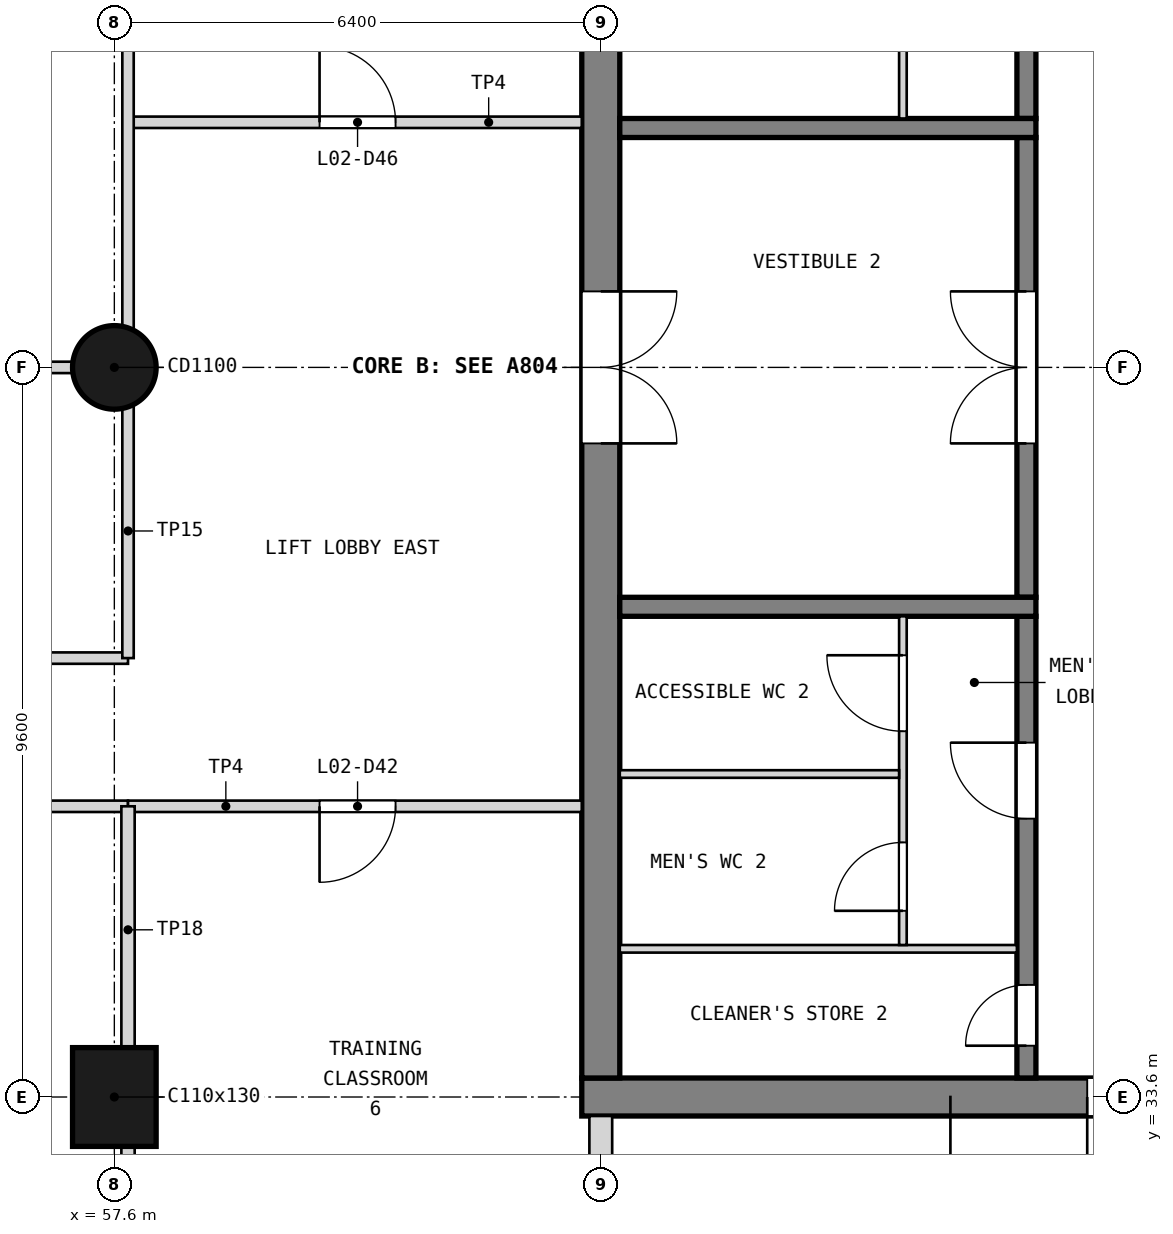
"""IFC4 building model, lengths in metres.
Left out: names, types, materials, properties, quantities, classifications, styles, units other than length and angle.
Written with IfcOpenShell. Run it as: python <this file> out.ifc"""

import sys

from ifc_helpers import new_model, si_unit, direction, frame, frame_2d, origin, origin_2d, place, context, subcontext, project, spatial, rectangle, circle, extrude, element, fill, save


model = new_model("IFC4")
c1 = context("Model", 3, precision=1e-05, world=origin(), true_north=direction((0.0, 1.0)))
c2 = subcontext(c1, "Body", "Model", "MODEL_VIEW")
j1 = project(units=[si_unit("LENGTHUNIT", "METRE"), si_unit("PLANEANGLEUNIT", "RADIAN")], contexts=[c1])
p1 = place(None, origin())
s1 = spatial("IfcSite", under=j1, at=p1, CompositionType="ELEMENT")
p2 = place(p1, origin())
s2 = spatial("IfcBuilding", under=s1, at=p2, CompositionType="ELEMENT")
p3 = place(p2, frame((0.0, 0.0, 8.4)))
s3 = spatial("IfcBuildingStorey", under=s2, at=p3, CompositionType="ELEMENT", Elevation=8.4)
p4 = place(p3, frame((63.75, 33.6, 0.0), z_axis=(0.0, 0.0, 1.0), x_axis=(1.0, 0.0, 0.0)))
e1 = element("IfcWall", 1, at=p4, inside=s3, PredefinedType="SHEAR", context=c2, shape_type="SweptSolid", body=[
    extrude(rectangle(XDim=13.3, YDim=0.5, at=frame_2d((6.65, 0.0))), origin(), (0.0, 0.0, 1.0), 4.5),
])
p5 = place(p4, frame((11.05, 0.0, 1.0)))
e2 = element("IfcOpeningElement", 2, at=p5, cuts=e1, PredefinedType="OPENING", context=c2, shape_type="SweptSolid", body=[
    extrude(rectangle(XDim=0.4, YDim=2.0, at=frame_2d((0.2, 1.0))), frame((0.0, 0.26, 0.0), z_axis=(0.0, -1.0, 0.0), x_axis=(1.0, 0.0, 0.0)), (0.0, 0.0, 1.0), 0.52),
])
p6 = place(p4, frame((6.65, 0.0, 0.0)))
e3 = element("IfcOpeningElement", 3, at=p6, cuts=e1, PredefinedType="OPENING", context=c2, shape_type="SweptSolid", body=[
    extrude(rectangle(XDim=2.0, YDim=2.1, at=frame_2d((1.0, 1.05))), frame((0.0, 0.26, 0.0), z_axis=(0.0, -1.0, 0.0), x_axis=(1.0, 0.0, 0.0)), (0.0, 0.0, 1.0), 0.52),
])
p7 = place(p3, frame((64.0, 33.85, 0.0), z_axis=(0.0, 0.0, 1.0), x_axis=(0.0, 1.0, 0.0)))
e4 = element("IfcWall", 4, at=p7, inside=s3, PredefinedType="SHEAR", context=c2, shape_type="SweptSolid", body=[
    extrude(rectangle(XDim=18.7, YDim=0.5, at=frame_2d((9.35, 0.0))), origin(), (0.0, 0.0, 1.0), 4.5),
])
p8 = place(p7, frame((8.35, 0.0, 0.0)))
e5 = element("IfcOpeningElement", 5, at=p8, cuts=e4, PredefinedType="OPENING", context=c2, shape_type="SweptSolid", body=[
    extrude(rectangle(XDim=2.0, YDim=2.1, at=frame_2d((1.0, 1.05))), frame((0.0, 0.26, 0.0), z_axis=(0.0, -1.0, 0.0), x_axis=(1.0, 0.0, 0.0)), (0.0, 0.0, 1.0), 0.52),
])
p9 = place(p3, frame((57.6, 33.6, 0.0), z_axis=(0.0, 0.0, 1.0), x_axis=(1.0, 0.0, 0.0)))
e6 = element("IfcColumn", 6, at=p9, inside=s3, PredefinedType="COLUMN", context=c2, shape_type="SweptSolid", body=[
    extrude(rectangle(XDim=1.1, YDim=1.3, at=origin_2d()), origin(), (0.0, 0.0, 1.0), 4.5),
])
p10 = place(p3, frame((57.6, 43.2, 0.0), z_axis=(0.0, 0.0, 1.0), x_axis=(1.0, 0.0, 0.0)))
e7 = element("IfcColumn", 7, at=p10, inside=s3, PredefinedType="COLUMN", context=c2, shape_type="SweptSolid", body=[
    extrude(circle(Radius=0.55, at=origin_2d()), origin(), (0.0, 0.0, 1.0), 4.5),
])
p11 = place(p3, frame((64.0, 31.0, 0.0), z_axis=(0.0, 0.0, 1.0), x_axis=(0.0, 1.0, 0.0)))
e8 = element("IfcWall", 8, at=p11, inside=s3, PredefinedType="SOLIDWALL", context=c2, shape_type="SweptSolid", body=[
    extrude(rectangle(XDim=2.35, YDim=0.3, at=frame_2d((1.175, 0.0))), origin(), (0.0, 0.0, 1.0), 3.48),
])
p12 = place(p3, frame((69.6, 33.85, 0.0), z_axis=(0.0, 0.0, 1.0), x_axis=(0.0, 1.0, 0.0)))
e9 = element("IfcWall", 9, at=p12, inside=s3, PredefinedType="SOLIDWALL", context=c2, shape_type="SweptSolid", body=[
    extrude(rectangle(XDim=6.075, YDim=0.25, at=frame_2d((3.038, 0.0))), origin(), (0.0, 0.0, 1.0), 4.2),
])
p13 = place(p12, frame((0.425, 0.0, 0.0)))
e10 = element("IfcOpeningElement", 10, at=p13, cuts=e9, PredefinedType="OPENING", context=c2, shape_type="SweptSolid", body=[
    extrude(rectangle(XDim=0.8, YDim=2.1, at=frame_2d((0.4, 1.05))), frame((0.0, 0.135, 0.0), z_axis=(0.0, -1.0, 0.0), x_axis=(1.0, 0.0, 0.0)), (0.0, 0.0, 1.0), 0.27),
])
p14 = place(p12, frame((3.413, 0.0, 0.0)))
e11 = element("IfcOpeningElement", 11, at=p14, cuts=e9, PredefinedType="OPENING", context=c2, shape_type="SweptSolid", body=[
    extrude(rectangle(XDim=1.0, YDim=2.1, at=frame_2d((0.5, 1.05))), frame((0.0, 0.135, 0.0), z_axis=(0.0, -1.0, 0.0), x_axis=(1.0, 0.0, 0.0)), (0.0, 0.0, 1.0), 0.27),
])
p15 = place(p3, frame((69.6, 40.175, 0.0), z_axis=(0.0, 0.0, 1.0), x_axis=(0.0, 1.0, 0.0)))
e12 = element("IfcWall", 12, at=p15, inside=s3, PredefinedType="SOLIDWALL", context=c2, shape_type="SweptSolid", body=[
    extrude(rectangle(XDim=6.05, YDim=0.25, at=frame_2d((3.025, 0.0))), origin(), (0.0, 0.0, 1.0), 4.2),
])
p16 = place(p15, frame((2.025, 0.0, 0.0)))
e13 = element("IfcOpeningElement", 13, at=p16, cuts=e12, PredefinedType="OPENING", context=c2, shape_type="SweptSolid", body=[
    extrude(rectangle(XDim=2.0, YDim=2.1, at=frame_2d((1.0, 1.05))), frame((0.0, 0.135, 0.0), z_axis=(0.0, -1.0, 0.0), x_axis=(1.0, 0.0, 0.0)), (0.0, 0.0, 1.0), 0.27),
])
p17 = place(p3, frame((69.6, 46.475, 0.0), z_axis=(0.0, 0.0, 1.0), x_axis=(0.0, 1.0, 0.0)))
e14 = element("IfcWall", 14, at=p17, inside=s3, PredefinedType="SOLIDWALL", context=c2, shape_type="SweptSolid", body=[
    extrude(rectangle(XDim=6.075, YDim=0.25, at=frame_2d((3.038, 0.0))), origin(), (0.0, 0.0, 1.0), 4.2),
])
p18 = place(p17, frame((1.312, 0.0, 0.0)))
e15 = element("IfcOpeningElement", 15, at=p18, cuts=e14, PredefinedType="OPENING", context=c2, shape_type="SweptSolid", body=[
    extrude(rectangle(XDim=1.0, YDim=2.1, at=frame_2d((0.5, 1.05))), frame((0.0, 0.135, 0.0), z_axis=(0.0, -1.0, 0.0), x_axis=(1.0, 0.0, 0.0)), (0.0, 0.0, 1.0), 0.27),
])
p19 = place(p17, frame((4.45, 0.0, 0.0)))
e16 = element("IfcOpeningElement", 16, at=p19, cuts=e14, PredefinedType="OPENING", context=c2, shape_type="SweptSolid", body=[
    extrude(rectangle(XDim=0.9, YDim=2.1, at=frame_2d((0.45, 1.05))), frame((0.0, 0.135, 0.0), z_axis=(0.0, -1.0, 0.0), x_axis=(1.0, 0.0, 0.0)), (0.0, 0.0, 1.0), 0.27),
])
for number, where, z_axis, x_axis in (
    (17, (69.725, 40.05, 0.0), (0.0, 0.0, 1.0), (-1.0, 0.0, 0.0)),
    (18, (69.725, 46.35, 0.0), (0.0, 0.0, 1.0), (-1.0, 0.0, 0.0)),
):
    element("IfcWall", number, at=place(p3, frame(where, z_axis=z_axis, x_axis=x_axis)), inside=s3, PredefinedType="SOLIDWALL", context=c2, shape_type="SweptSolid", body=[
        extrude(rectangle(XDim=5.475, YDim=0.25, at=frame_2d((2.738, 0.0))), origin(), (0.0, 0.0, 1.0), 4.2),
    ])
p20 = place(p3, frame((69.475, 35.55, 0.0), z_axis=(0.0, 0.0, 1.0), x_axis=(-1.0, 0.0, 0.0)))
e19 = element("IfcWall", 19, at=p20, inside=s3, PredefinedType="PARTITIONING", context=c2, shape_type="SweptSolid", body=[
    extrude(rectangle(XDim=5.225, YDim=0.1, at=frame_2d((2.613, 0.0))), origin(), (0.0, 0.0, 1.0), 4.2),
])
p21 = place(p3, frame((67.975, 35.6, 0.0), z_axis=(0.0, 0.0, 1.0), x_axis=(0.0, 1.0, 0.0)))
e20 = element("IfcWall", 20, at=p21, inside=s3, PredefinedType="PARTITIONING", context=c2, shape_type="SweptSolid", body=[
    extrude(rectangle(XDim=4.325, YDim=0.1, at=frame_2d((2.163, 0.0))), origin(), (0.0, 0.0, 1.0), 4.2),
])
p22 = place(p21, frame((0.45, 0.0, 0.0)))
e21 = element("IfcOpeningElement", 21, at=p22, cuts=e20, PredefinedType="OPENING", context=c2, shape_type="SweptSolid", body=[
    extrude(rectangle(XDim=0.9, YDim=2.1, at=frame_2d((0.45, 1.05))), frame((0.0, 0.06, 0.0), z_axis=(0.0, -1.0, 0.0), x_axis=(1.0, 0.0, 0.0)), (0.0, 0.0, 1.0), 0.12),
])
p23 = place(p21, frame((2.812, 0.0, 0.0)))
e22 = element("IfcOpeningElement", 22, at=p23, cuts=e20, PredefinedType="OPENING", context=c2, shape_type="SweptSolid", body=[
    extrude(rectangle(XDim=1.0, YDim=2.1, at=frame_2d((0.5, 1.05))), frame((0.0, 0.06, 0.0), z_axis=(0.0, -1.0, 0.0), x_axis=(1.0, 0.0, 0.0)), (0.0, 0.0, 1.0), 0.12),
])
p24 = place(p3, frame((67.925, 37.85, 0.0), z_axis=(0.0, 0.0, 1.0), x_axis=(-1.0, 0.0, 0.0)))
e23 = element("IfcWall", 23, at=p24, inside=s3, PredefinedType="PARTITIONING", context=c2, shape_type="SweptSolid", body=[
    extrude(rectangle(XDim=3.675, YDim=0.1, at=frame_2d((1.837, 0.0))), origin(), (0.0, 0.0, 1.0), 4.2),
])
p25 = place(p3, frame((67.975, 46.475, 0.0), z_axis=(0.0, 0.0, 1.0), x_axis=(0.0, 1.0, 0.0)))
e24 = element("IfcWall", 24, at=p25, inside=s3, PredefinedType="PARTITIONING", context=c2, shape_type="SweptSolid", body=[
    extrude(rectangle(XDim=3.625, YDim=0.1, at=frame_2d((1.812, 0.0))), origin(), (0.0, 0.0, 1.0), 4.2),
])
p26 = place(p25, frame((1.363, 0.0, 0.0)))
e25 = element("IfcOpeningElement", 25, at=p26, cuts=e24, PredefinedType="OPENING", context=c2, shape_type="SweptSolid", body=[
    extrude(rectangle(XDim=0.9, YDim=2.1, at=frame_2d((0.45, 1.05))), frame((0.0, 0.06, 0.0), z_axis=(0.0, -1.0, 0.0), x_axis=(1.0, 0.0, 0.0)), (0.0, 0.0, 1.0), 0.12),
])
p27 = place(p3, frame((51.38, 37.425, 0.0), z_axis=(0.0, 0.0, 1.0), x_axis=(1.0, 0.0, 0.0)))
e26 = element("IfcWall", 26, at=p27, inside=s3, PredefinedType="PARTITIONING", context=c2, shape_type="SweptSolid", body=[
    extrude(rectangle(XDim=6.4, YDim=0.15, at=frame_2d((3.2, 0.0))), origin(), (0.0, 0.0, 1.0), 4.28),
])
p28 = place(p27, frame((2.72, 0.0, 0.0)))
e27 = element("IfcOpeningElement", 27, at=p28, cuts=e26, PredefinedType="OPENING", context=c2, shape_type="SweptSolid", body=[
    extrude(rectangle(XDim=1.0, YDim=2.1, at=frame_2d((0.5, 1.05))), frame((0.0, 0.085, 0.0), z_axis=(0.0, -1.0, 0.0), x_axis=(1.0, 0.0, 0.0)), (0.0, 0.0, 1.0), 0.17),
])
p29 = place(p3, frame((57.78, 37.425, 0.0), z_axis=(0.0, 0.0, 1.0), x_axis=(1.0, 0.0, 0.0)))
e28 = element("IfcWall", 28, at=p29, inside=s3, PredefinedType="PARTITIONING", context=c2, shape_type="SweptSolid", body=[
    extrude(rectangle(XDim=5.97, YDim=0.15, at=frame_2d((2.985, 0.0))), origin(), (0.0, 0.0, 1.0), 4.28),
])
p30 = place(p29, frame((2.52, 0.0, 0.0)))
e29 = element("IfcOpeningElement", 29, at=p30, cuts=e28, PredefinedType="OPENING", context=c2, shape_type="SweptSolid", body=[
    extrude(rectangle(XDim=1.0, YDim=2.1, at=frame_2d((0.5, 1.05))), frame((0.0, 0.085, 0.0), z_axis=(0.0, -1.0, 0.0), x_axis=(1.0, 0.0, 0.0)), (0.0, 0.0, 1.0), 0.17),
])
p31 = place(p3, frame((57.78, 31.3, 0.0), z_axis=(0.0, 0.0, 1.0), x_axis=(0.0, 1.0, 0.0)))
e30 = element("IfcWall", 30, at=p31, inside=s3, PredefinedType="PARTITIONING", context=c2, shape_type="SweptSolid", body=[
    extrude(rectangle(XDim=1.67, YDim=0.175, at=frame_2d((0.835, 0.0))), origin(), (0.0, 0.0, 1.0), 3.38),
])
p32 = place(p3, frame((57.78, 34.23, 0.0), z_axis=(0.0, 0.0, 1.0), x_axis=(0.0, 1.0, 0.0)))
e31 = element("IfcWall", 31, at=p32, inside=s3, PredefinedType="PARTITIONING", context=c2, shape_type="SweptSolid", body=[
    extrude(rectangle(XDim=3.195, YDim=0.175, at=frame_2d((1.598, 0.0))), origin(), (0.0, 0.0, 1.0), 3.38),
])
p33 = place(p3, frame((31.82, 39.375, 0.0), z_axis=(0.0, 0.0, 1.0), x_axis=(1.0, 0.0, 0.0)))
e32 = element("IfcWall", 32, at=p33, inside=s3, PredefinedType="PARTITIONING", context=c2, shape_type="SweptSolid", body=[
    extrude(rectangle(XDim=25.96, YDim=0.15, at=frame_2d((12.98, 0.0))), origin(), (0.0, 0.0, 1.0), 4.28),
])
p34 = place(p33, frame((5.63, 0.0, 0.0)))
e33 = element("IfcOpeningElement", 33, at=p34, cuts=e32, PredefinedType="OPENING", context=c2, shape_type="SweptSolid", body=[
    extrude(rectangle(XDim=1.8, YDim=2.1, at=frame_2d((0.9, 1.05))), frame((0.0, 0.085, 0.0), z_axis=(0.0, -1.0, 0.0), x_axis=(1.0, 0.0, 0.0)), (0.0, 0.0, 1.0), 0.17),
])
p35 = place(p33, frame((18.53, 0.0, 0.0)))
e34 = element("IfcOpeningElement", 34, at=p35, cuts=e32, PredefinedType="OPENING", context=c2, shape_type="SweptSolid", body=[
    extrude(rectangle(XDim=1.8, YDim=2.1, at=frame_2d((0.9, 1.05))), frame((0.0, 0.085, 0.0), z_axis=(0.0, -1.0, 0.0), x_axis=(1.0, 0.0, 0.0)), (0.0, 0.0, 1.0), 0.17),
])
p36 = place(p3, frame((31.82, 43.2, 0.0), z_axis=(0.0, 0.0, 1.0), x_axis=(1.0, 0.0, 0.0)))
e35 = element("IfcWall", 35, at=p36, inside=s3, PredefinedType="PARTITIONING", context=c2, shape_type="SweptSolid", body=[
    extrude(rectangle(XDim=25.96, YDim=0.15, at=frame_2d((12.98, 0.0))), origin(), (0.0, 0.0, 1.0), 3.48),
])
p37 = place(p36, frame((3.175, 0.0, 0.0)))
e36 = element("IfcOpeningElement", 36, at=p37, cuts=e35, PredefinedType="OPENING", context=c2, shape_type="SweptSolid", body=[
    extrude(rectangle(XDim=1.8, YDim=2.1, at=frame_2d((0.9, 1.05))), frame((0.0, 0.085, 0.0), z_axis=(0.0, -1.0, 0.0), x_axis=(1.0, 0.0, 0.0)), (0.0, 0.0, 1.0), 0.17),
])
p38 = place(p36, frame((10.325, 0.0, 0.0)))
e37 = element("IfcOpeningElement", 37, at=p38, cuts=e35, PredefinedType="OPENING", context=c2, shape_type="SweptSolid", body=[
    extrude(rectangle(XDim=1.8, YDim=2.1, at=frame_2d((0.9, 1.05))), frame((0.0, 0.085, 0.0), z_axis=(0.0, -1.0, 0.0), x_axis=(1.0, 0.0, 0.0)), (0.0, 0.0, 1.0), 0.17),
])
p39 = place(p36, frame((17.518, 0.0, 0.0)))
e38 = element("IfcOpeningElement", 38, at=p39, cuts=e35, PredefinedType="OPENING", context=c2, shape_type="SweptSolid", body=[
    extrude(rectangle(XDim=1.0, YDim=2.1, at=frame_2d((0.5, 1.05))), frame((0.0, 0.085, 0.0), z_axis=(0.0, -1.0, 0.0), x_axis=(1.0, 0.0, 0.0)), (0.0, 0.0, 1.0), 0.17),
])
p40 = place(p36, frame((22.607, 0.0, 0.0)))
e39 = element("IfcOpeningElement", 39, at=p40, cuts=e35, PredefinedType="OPENING", context=c2, shape_type="SweptSolid", body=[
    extrude(rectangle(XDim=1.8, YDim=2.1, at=frame_2d((0.9, 1.05))), frame((0.0, 0.085, 0.0), z_axis=(0.0, -1.0, 0.0), x_axis=(1.0, 0.0, 0.0)), (0.0, 0.0, 1.0), 0.17),
])
p41 = place(p3, frame((57.78, 46.425, 0.0), z_axis=(0.0, 0.0, 1.0), x_axis=(1.0, 0.0, 0.0)))
e40 = element("IfcWall", 40, at=p41, inside=s3, PredefinedType="PARTITIONING", context=c2, shape_type="SweptSolid", body=[
    extrude(rectangle(XDim=5.97, YDim=0.15, at=frame_2d((2.985, 0.0))), origin(), (0.0, 0.0, 1.0), 4.28),
])
p42 = place(p41, frame((2.52, 0.0, 0.0)))
e41 = element("IfcOpeningElement", 41, at=p42, cuts=e40, PredefinedType="OPENING", context=c2, shape_type="SweptSolid", body=[
    extrude(rectangle(XDim=1.0, YDim=2.1, at=frame_2d((0.5, 1.05))), frame((0.0, 0.085, 0.0), z_axis=(0.0, -1.0, 0.0), x_axis=(1.0, 0.0, 0.0)), (0.0, 0.0, 1.0), 0.17),
])
p43 = place(p3, frame((57.78, 39.375, 0.0), z_axis=(0.0, 0.0, 1.0), x_axis=(0.0, 1.0, 0.0)))
e42 = element("IfcWall", 42, at=p43, inside=s3, PredefinedType="PARTITIONING", context=c2, shape_type="SweptSolid", body=[
    extrude(rectangle(XDim=3.325, YDim=0.15, at=frame_2d((1.663, 0.0))), origin(), (0.0, 0.0, 1.0), 3.38),
])
p44 = place(p3, frame((57.78, 43.7, 0.0), z_axis=(0.0, 0.0, 1.0), x_axis=(0.0, 1.0, 0.0)))
e43 = element("IfcWall", 43, at=p44, inside=s3, PredefinedType="PARTITIONING", context=c2, shape_type="SweptSolid", body=[
    extrude(rectangle(XDim=8.47, YDim=0.15, at=frame_2d((4.235, 0.0))), origin(), (0.0, 0.0, 1.0), 3.38),
])
p45 = place(p16, origin())
e44 = element("IfcDoor", 44, at=p45, inside=s3, OperationType="DOUBLE_DOOR_SINGLE_SWING", PredefinedType="DOOR", context=c2, shape_type="SweptSolid", body=[
    extrude(rectangle(XDim=2.0, YDim=2.1, at=frame_2d((1.0, 1.05))), frame((0.0, 0.025, 0.0), z_axis=(0.0, -1.0, 0.0), x_axis=(1.0, 0.0, 0.0)), (0.0, 0.0, 1.0), 0.05),
])
fill(e13, e44)
p46 = place(p8, frame((2.0, 0.0, 0.0), z_axis=(0.0, 0.0, 1.0), x_axis=(-1.0, 0.0, 0.0)))
e45 = element("IfcDoor", 45, at=p46, inside=s3, OperationType="DOUBLE_DOOR_SINGLE_SWING", PredefinedType="DOOR", context=c2, shape_type="SweptSolid", body=[
    extrude(rectangle(XDim=2.0, YDim=2.1, at=frame_2d((1.0, 1.05))), frame((0.0, 0.025, 0.0), z_axis=(0.0, -1.0, 0.0), x_axis=(1.0, 0.0, 0.0)), (0.0, 0.0, 1.0), 0.05),
])
fill(e5, e45)
p47 = place(p13, origin())
e46 = element("IfcDoor", 46, at=p47, inside=s3, OperationType="SINGLE_SWING_LEFT", PredefinedType="DOOR", context=c2, shape_type="SweptSolid", body=[
    extrude(rectangle(XDim=0.8, YDim=2.1, at=frame_2d((0.4, 1.05))), frame((0.0, 0.025, 0.0), z_axis=(0.0, -1.0, 0.0), x_axis=(1.0, 0.0, 0.0)), (0.0, 0.0, 1.0), 0.05),
])
fill(e10, e46)
p48 = place(p14, origin())
e47 = element("IfcDoor", 47, at=p48, inside=s3, OperationType="SINGLE_SWING_RIGHT", PredefinedType="DOOR", context=c2, shape_type="SweptSolid", body=[
    extrude(rectangle(XDim=1.0, YDim=2.1, at=frame_2d((0.5, 1.05))), frame((0.0, 0.025, 0.0), z_axis=(0.0, -1.0, 0.0), x_axis=(1.0, 0.0, 0.0)), (0.0, 0.0, 1.0), 0.05),
])
fill(e11, e47)
p49 = place(p22, origin())
e48 = element("IfcDoor", 48, at=p49, inside=s3, OperationType="SINGLE_SWING_LEFT", PredefinedType="DOOR", context=c2, shape_type="SweptSolid", body=[
    extrude(rectangle(XDim=0.9, YDim=2.1, at=frame_2d((0.45, 1.05))), frame((0.0, 0.025, 0.0), z_axis=(0.0, -1.0, 0.0), x_axis=(1.0, 0.0, 0.0)), (0.0, 0.0, 1.0), 0.05),
])
fill(e21, e48)
p50 = place(p23, origin())
e49 = element("IfcDoor", 49, at=p50, inside=s3, OperationType="SINGLE_SWING_RIGHT", PredefinedType="DOOR", context=c2, shape_type="SweptSolid", body=[
    extrude(rectangle(XDim=1.0, YDim=2.1, at=frame_2d((0.5, 1.05))), frame((0.0, 0.025, 0.0), z_axis=(0.0, -1.0, 0.0), x_axis=(1.0, 0.0, 0.0)), (0.0, 0.0, 1.0), 0.05),
])
fill(e22, e49)
p51 = place(p6, frame((2.0, 0.0, 0.0), z_axis=(0.0, 0.0, 1.0), x_axis=(-1.0, 0.0, 0.0)))
e50 = element("IfcDoor", 50, at=p51, inside=s3, OperationType="DOUBLE_DOOR_SINGLE_SWING", PredefinedType="DOOR", context=c2, shape_type="SweptSolid", body=[
    extrude(rectangle(XDim=2.0, YDim=2.1, at=frame_2d((1.0, 1.05))), frame((0.0, 0.025, 0.0), z_axis=(0.0, -1.0, 0.0), x_axis=(1.0, 0.0, 0.0)), (0.0, 0.0, 1.0), 0.05),
])
fill(e3, e50)
p52 = place(p30, frame((1.0, 0.0, 0.0), z_axis=(0.0, 0.0, 1.0), x_axis=(-1.0, 0.0, 0.0)))
e51 = element("IfcDoor", 51, at=p52, inside=s3, OperationType="SINGLE_SWING_RIGHT", PredefinedType="DOOR", context=c2, shape_type="SweptSolid", body=[
    extrude(rectangle(XDim=1.0, YDim=2.1, at=frame_2d((0.5, 1.05))), frame((0.0, 0.025, 0.0), z_axis=(0.0, -1.0, 0.0), x_axis=(1.0, 0.0, 0.0)), (0.0, 0.0, 1.0), 0.05),
])
fill(e29, e51)
p53 = place(p42, origin())
e52 = element("IfcDoor", 52, at=p53, inside=s3, OperationType="SINGLE_SWING_LEFT", PredefinedType="DOOR", context=c2, shape_type="SweptSolid", body=[
    extrude(rectangle(XDim=1.0, YDim=2.1, at=frame_2d((0.5, 1.05))), frame((0.0, 0.025, 0.0), z_axis=(0.0, -1.0, 0.0), x_axis=(1.0, 0.0, 0.0)), (0.0, 0.0, 1.0), 0.05),
])
fill(e41, e52)
save(model, sys.argv[1])
